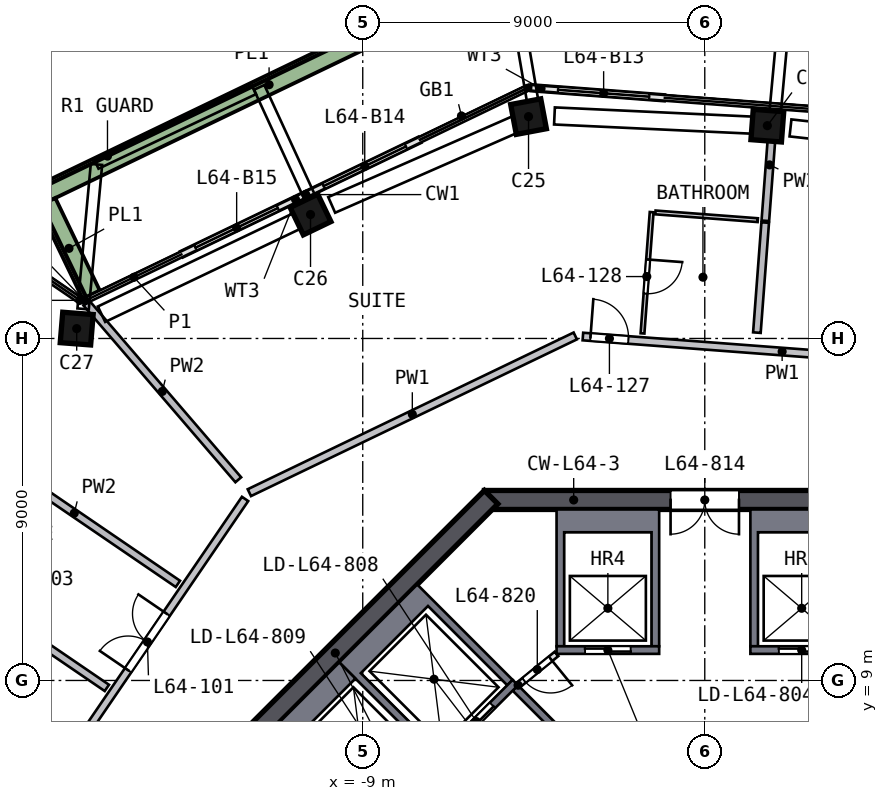
"""IFC4 building model, lengths in metres.
Left out: names, types, materials, properties, quantities, classifications, styles, units other than length and angle.
Written with IfcOpenShell. Run it as: python <this file> out.ifc"""

import sys

from ifc_helpers import new_model, si_unit, direction, frame, frame_2d, origin, origin_2d, place, context, subcontext, project, spatial, polyline, rectangle, outline, extrude, element, fill, save


model = new_model("IFC4")
c1 = context("Model", 3, precision=1e-05, world=origin(), true_north=direction((0.0, 1.0)))
c2 = subcontext(c1, "Body", "Model", "MODEL_VIEW")
j1 = project(units=[si_unit("LENGTHUNIT", "METRE"), si_unit("PLANEANGLEUNIT", "RADIAN")], contexts=[c1])
p1 = place(None, origin())
s1 = spatial("IfcSite", under=j1, at=p1, CompositionType="ELEMENT")
p2 = place(p1, origin())
s2 = spatial("IfcBuilding", under=s1, at=p2, CompositionType="ELEMENT")
p3 = place(p2, frame((0.0, 0.0, 259.5)))
s3 = spatial("IfcBuildingStorey", under=s2, at=p3, CompositionType="ELEMENT", Elevation=259.5)
p4 = place(p3, frame((1.782, 23.591, 0.0), z_axis=(-0.112238709, 0.007601181, 0.9936522), x_axis=(-0.990776389, 0.075549588, -0.112491804)))
e1 = element("IfcColumn", 1, at=p4, inside=s3, PredefinedType="COLUMN", context=c2, shape_type="SweptSolid", body=[
    extrude(rectangle(XDim=0.8, YDim=0.8, at=origin_2d()), origin(), (0.0, 0.0, 1.0), 3.019),
])
p5 = place(p3, frame((-4.501, 23.865, 0.0), z_axis=(-0.113331177, -0.022391395, 0.993304923), x_axis=(0.976067383, 0.184250053, 0.115517882)))
e2 = element("IfcColumn", 2, at=p5, inside=s3, PredefinedType="COLUMN", context=c2, shape_type="SweptSolid", body=[
    extrude(rectangle(XDim=0.8, YDim=0.8, at=origin_2d()), origin(), (0.0, 0.0, 1.0), 3.02),
])
p6 = place(p3, frame((-10.252, 21.322, 0.0), z_axis=(-0.100998536, -0.049569338, 0.993650933), x_axis=(-0.895692503, -0.430206945, -0.112502994)))
e3 = element("IfcColumn", 3, at=p6, inside=s3, PredefinedType="COLUMN", context=c2, shape_type="SweptSolid", body=[
    extrude(rectangle(XDim=0.8, YDim=0.8, at=origin_2d()), origin(), (0.0, 0.0, 1.0), 3.019),
])
p7 = place(p3, frame((-16.422, 18.355, 0.0), z_axis=(-0.08663924, -0.078799682, 0.993118448), x_axis=(0.993392134, -0.082151617, 0.080144738)))
e4 = element("IfcColumn", 4, at=p7, inside=s3, PredefinedType="COLUMN", context=c2, shape_type="SweptSolid", body=[
    extrude(rectangle(XDim=0.8, YDim=0.8, at=origin_2d()), origin(), (0.0, 0.0, 1.0), 3.021),
])
p8 = place(p3, frame((5.799, 13.75, 0.0), z_axis=(0.0, 0.0, 1.0), x_axis=(-1.0, 0.0, 0.0)))
e5 = element("IfcWall", 5, at=p8, inside=s3, PredefinedType="SHEAR", context=c2, shape_type="SweptSolid", body=[
    extrude(rectangle(XDim=11.598, YDim=0.5, at=frame_2d((5.799, 0.0))), origin(), (0.0, 0.0, 1.0), 3.5),
])
p9 = place(p8, frame((4.899, 0.0, 0.0)))
e6 = element("IfcOpeningElement", 6, at=p9, cuts=e5, PredefinedType="OPENING", context=c2, shape_type="SweptSolid", body=[
    extrude(rectangle(XDim=1.8, YDim=2.1, at=frame_2d((0.9, 1.05))), frame((0.0, 0.26, 0.0), z_axis=(0.0, -1.0, 0.0), x_axis=(1.0, 0.0, 0.0)), (0.0, 0.0, 1.0), 0.52),
])
p10 = place(p3, frame((-5.622, 13.823, 0.0), z_axis=(0.0, 0.0, 1.0), x_axis=(-0.707106781, -0.707106781, 0.0)))
e7 = element("IfcWall", 7, at=p10, inside=s3, PredefinedType="SHEAR", context=c2, shape_type="SweptSolid", body=[
    extrude(rectangle(XDim=11.598, YDim=0.5, at=frame_2d((5.799, 0.0))), origin(), (0.0, 0.0, 1.0), 3.5),
])
p11 = place(p3, frame((-1.066, 24.333, 0.0), z_axis=(0.0, 0.0, 1.0), x_axis=(-0.997159679, 0.075316491, 0.0)))
e8 = element("IfcWall", 8, at=p11, inside=s3, PredefinedType="SOLIDWALL", context=c2, shape_type="SweptSolid", body=[
    extrude(rectangle(XDim=3.504, YDim=0.15, at=frame_2d((1.752, 0.0))), origin(), (0.0, 0.0, 1.0), 2.935),
])
p12 = place(p11, frame((0.4, 0.0, 0.0)))
e9 = element("IfcOpeningElement", 9, at=p12, cuts=e8, PredefinedType="OPENING", context=c2, shape_type="SweptSolid", body=[
    extrude(rectangle(XDim=2.4, YDim=2.4, at=frame_2d((1.2, 1.2))), frame((0.0, 0.085, 0.0), z_axis=(0.0, -1.0, 0.0), x_axis=(1.0, 0.0, 0.0)), (0.0, 0.0, 1.0), 0.17),
])
p13 = place(p3, frame((-7.506, 23.225, 0.0), z_axis=(0.0, 0.0, 1.0), x_axis=(-0.901215754, -0.433370702, 0.0)))
e10 = element("IfcWall", 10, at=p13, inside=s3, PredefinedType="SOLIDWALL", context=c2, shape_type="SweptSolid", body=[
    extrude(rectangle(XDim=3.3, YDim=0.15, at=frame_2d((1.65, 0.0))), origin(), (0.0, 0.0, 1.0), 2.935),
])
p14 = place(p13, frame((0.4, 0.0, 0.0)))
e11 = element("IfcOpeningElement", 11, at=p14, cuts=e10, PredefinedType="OPENING", context=c2, shape_type="SweptSolid", body=[
    extrude(rectangle(XDim=2.4, YDim=2.4, at=frame_2d((1.2, 1.2))), frame((0.0, 0.085, 0.0), z_axis=(0.0, -1.0, 0.0), x_axis=(1.0, 0.0, 0.0)), (0.0, 0.0, 1.0), 0.17),
])
p15 = place(p3, frame((-10.48, 21.795, 0.0), z_axis=(0.0, 0.0, 1.0), x_axis=(-0.90124235, -0.43331539, 0.0)))
e12 = element("IfcWall", 12, at=p15, inside=s3, PredefinedType="SOLIDWALL", context=c2, shape_type="SweptSolid", body=[
    extrude(rectangle(XDim=3.64, YDim=0.15, at=frame_2d((1.82, 0.0))), origin(), (0.0, 0.0, 1.0), 2.935),
])
p16 = place(p15, frame((0.84, 0.0, 0.0)))
e13 = element("IfcOpeningElement", 13, at=p16, cuts=e12, PredefinedType="OPENING", context=c2, shape_type="SweptSolid", body=[
    extrude(rectangle(XDim=2.4, YDim=2.4, at=frame_2d((1.2, 1.2))), frame((0.0, 0.085, 0.0), z_axis=(0.0, -1.0, 0.0), x_axis=(1.0, 0.0, 0.0)), (0.0, 0.0, 1.0), 0.17),
])
p17 = place(p3, frame((-5.281, 27.651, 0.0), z_axis=(0.0, 0.0, 1.0), x_axis=(-0.901229979, -0.433341118, 0.0)))
e14 = element("IfcWall", 14, at=p17, inside=s3, PredefinedType="SOLIDWALL", context=c2, shape_type="SweptSolid", body=[
    extrude(rectangle(XDim=13.724, YDim=0.5, at=frame_2d((6.862, 0.0))), origin(), (0.0, 0.0, 1.0), 0.7),
])
p18 = place(p3, frame((-17.315, 21.587, 0.0), z_axis=(0.0, 0.0, 1.0), x_axis=(0.433374971, -0.901213701, 0.0)))
e15 = element("IfcWall", 15, at=p18, inside=s3, PredefinedType="SOLIDWALL", context=c2, shape_type="SweptSolid", body=[
    extrude(rectangle(XDim=2.699, YDim=0.5, at=frame_2d((1.35, 0.0))), origin(), (0.0, 0.0, 1.0), 0.7),
])
p19 = place(p3, origin())
e16 = element("IfcWall", 16, at=p19, inside=s3, PredefinedType="SOLIDWALL", context=c2, shape_type="SweptSolid", body=[
    extrude(outline(polyline([(3.9, 9.9), (3.7, 9.9), (3.7, 12.9), (1.4, 12.9), (1.4, 9.9), (1.2, 9.9), (1.2, 13.5), (3.9, 13.5), (3.9, 9.9)])), origin(), (0.0, 0.0, 1.0), 3.0),
])
p20 = place(p3, frame((1.2, 9.8, 0.0), z_axis=(0.0, 0.0, 1.0), x_axis=(1.0, 0.0, 0.0)))
e17 = element("IfcWall", 17, at=p20, inside=s3, PredefinedType="SOLIDWALL", context=c2, shape_type="SweptSolid", body=[
    extrude(rectangle(XDim=2.7, YDim=0.2, at=frame_2d((1.35, 0.0))), origin(), (0.0, 0.0, 1.0), 3.0),
])
p21 = place(p20, frame((0.75, 0.0, 0.0)))
e18 = element("IfcOpeningElement", 18, at=p21, cuts=e17, PredefinedType="OPENING", context=c2, shape_type="SweptSolid", body=[
    extrude(rectangle(XDim=1.2, YDim=2.1, at=frame_2d((0.6, 1.05))), frame((0.0, 0.11, 0.0), z_axis=(0.0, -1.0, 0.0), x_axis=(1.0, 0.0, 0.0)), (0.0, 0.0, 1.0), 0.22),
])
p22 = place(p3, origin())
e19 = element("IfcWall", 19, at=p22, inside=s3, PredefinedType="SOLIDWALL", context=c2, shape_type="SweptSolid", body=[
    extrude(outline(polyline([(-3.9, 13.5), (-1.2, 13.5), (-1.2, 9.9), (-1.4, 9.9), (-1.4, 12.9), (-3.7, 12.9), (-3.7, 9.9), (-3.9, 9.9), (-3.9, 13.5)])), origin(), (0.0, 0.0, 1.0), 3.0),
])
p23 = place(p3, frame((-1.2, 9.8, 0.0), z_axis=(0.0, 0.0, 1.0), x_axis=(-1.0, 0.0, 0.0)))
e20 = element("IfcWall", 20, at=p23, inside=s3, PredefinedType="SOLIDWALL", context=c2, shape_type="SweptSolid", body=[
    extrude(rectangle(XDim=2.7, YDim=0.2, at=frame_2d((1.35, 0.0))), origin(), (0.0, 0.0, 1.0), 3.0),
])
p24 = place(p23, frame((0.75, 0.0, 0.0)))
e21 = element("IfcOpeningElement", 21, at=p24, cuts=e20, PredefinedType="OPENING", context=c2, shape_type="SweptSolid", body=[
    extrude(rectangle(XDim=1.2, YDim=2.1, at=frame_2d((0.6, 1.05))), frame((0.0, 0.11, 0.0), z_axis=(0.0, -1.0, 0.0), x_axis=(1.0, 0.0, 0.0)), (0.0, 0.0, 1.0), 0.22),
])
p25 = place(p3, origin())
e22 = element("IfcWall", 22, at=p25, inside=s3, PredefinedType="SOLIDWALL", context=c2, shape_type="SweptSolid", body=[
    extrude(outline(polyline([(-9.617, 9.475), (-7.566, 11.526), (-5.056, 9.016), (-5.197, 8.874), (-7.283, 10.96), (-9.051, 9.192), (-6.965, 7.106), (-7.106, 6.965), (-9.617, 9.475)])), origin(), (0.0, 0.0, 1.0), 3.0),
])
p26 = place(p3, frame((-4.985, 8.945, 0.0), z_axis=(0.0, 0.0, 1.0), x_axis=(-0.707106781, -0.707106781, 0.0)))
e23 = element("IfcWall", 23, at=p26, inside=s3, PredefinedType="SOLIDWALL", context=c2, shape_type="SweptSolid", body=[
    extrude(rectangle(XDim=2.9, YDim=0.2, at=frame_2d((1.45, 0.0))), origin(), (0.0, 0.0, 1.0), 3.0),
])
p27 = place(p26, frame((0.85, 0.0, 0.0)))
e24 = element("IfcOpeningElement", 24, at=p27, cuts=e23, PredefinedType="OPENING", context=c2, shape_type="SweptSolid", body=[
    extrude(rectangle(XDim=1.2, YDim=2.1, at=frame_2d((0.6, 1.05))), frame((0.0, 0.11, 0.0), z_axis=(0.0, -1.0, 0.0), x_axis=(1.0, 0.0, 0.0)), (0.0, 0.0, 1.0), 0.22),
])
p28 = place(p3, origin())
e25 = element("IfcWall", 25, at=p28, inside=s3, PredefinedType="SOLIDWALL", context=c2, shape_type="SweptSolid", body=[
    extrude(outline(polyline([(-11.526, 7.566), (-9.617, 9.475), (-9.192, 9.051), (-10.96, 7.283), (-8.874, 5.197), (-9.016, 5.056), (-11.526, 7.566)])), origin(), (0.0, 0.0, 1.0), 3.0),
])
p29 = place(p3, frame((-3.005, 6.823, 0.0), z_axis=(0.0, 0.0, 1.0), x_axis=(-0.707106781, 0.707106781, 0.0)))
e26 = element("IfcWall", 26, at=p29, inside=s3, PredefinedType="SOLIDWALL", context=c2, shape_type="SweptSolid", body=[
    extrude(rectangle(XDim=2.8, YDim=0.2, at=frame_2d((1.4, 0.0))), origin(), (0.0, 0.0, 1.0), 3.0),
])
p30 = place(p3, frame((-3.9, 9.7, 0.0), z_axis=(0.0, 0.0, 1.0), x_axis=(-0.775559878, -0.631274009, 0.0)))
e27 = element("IfcWall", 27, at=p30, inside=s3, PredefinedType="PARTITIONING", context=c2, shape_type="SweptSolid", body=[
    extrude(rectangle(XDim=1.308, YDim=0.15, at=frame_2d((0.654, 0.0))), origin(), (0.0, 0.0, 1.0), 3.0),
])
p31 = place(p30, frame((0.204, 0.0, 0.0)))
e28 = element("IfcOpeningElement", 28, at=p31, cuts=e27, PredefinedType="OPENING", context=c2, shape_type="SweptSolid", body=[
    extrude(rectangle(XDim=0.9, YDim=2.1, at=frame_2d((0.45, 1.05))), frame((0.0, 0.085, 0.0), z_axis=(0.0, -1.0, 0.0), x_axis=(1.0, 0.0, 0.0)), (0.0, 0.0, 1.0), 0.17),
])
p32 = place(p3, frame((-17.349, 6.083, 0.0), z_axis=(0.0, 0.0, 1.0), x_axis=(0.563804288, 0.825908424, 0.0)))
e29 = element("IfcWall", 29, at=p32, inside=s3, PredefinedType="SOLIDWALL", context=c2, shape_type="SweptSolid", body=[
    extrude(rectangle(XDim=9.316, YDim=0.2, at=frame_2d((4.658, 0.0))), origin(), (0.0, 0.0, 1.0), 3.0),
])
p33 = place(p32, frame((3.859, 0.0, 0.0)))
e30 = element("IfcOpeningElement", 30, at=p33, cuts=e29, PredefinedType="OPENING", context=c2, shape_type="SweptSolid", body=[
    extrude(rectangle(XDim=1.8, YDim=2.1, at=frame_2d((0.9, 1.05))), frame((0.0, 0.11, 0.0), z_axis=(0.0, -1.0, 0.0), x_axis=(1.0, 0.0, 0.0)), (0.0, 0.0, 1.0), 0.22),
])
p34 = place(p3, frame((-3.408, 18.066, 0.0), z_axis=(0.0, 0.0, 1.0), x_axis=(-0.901226991, -0.433347333, 0.0)))
e31 = element("IfcWall", 31, at=p34, inside=s3, PredefinedType="SOLIDWALL", context=c2, shape_type="SweptSolid", body=[
    extrude(rectangle(XDim=9.516, YDim=0.2, at=frame_2d((4.758, 0.0))), origin(), (0.0, 0.0, 1.0), 3.0),
])
p35 = place(p3, frame((-3.207, 18.051, 0.0), z_axis=(0.0, 0.0, 1.0), x_axis=(0.997158012, -0.075338566, 0.0)))
e32 = element("IfcWall", 32, at=p35, inside=s3, PredefinedType="SOLIDWALL", context=c2, shape_type="SweptSolid", body=[
    extrude(rectangle(XDim=9.116, YDim=0.2, at=frame_2d((4.558, 0.0))), origin(), (0.0, 0.0, 1.0), 3.0),
])
p36 = place(p35, frame((0.2, 0.0, 0.0)))
e33 = element("IfcOpeningElement", 33, at=p36, cuts=e32, PredefinedType="OPENING", context=c2, shape_type="SweptSolid", body=[
    extrude(rectangle(XDim=1.0, YDim=2.1, at=frame_2d((0.5, 1.05))), frame((0.0, 0.11, 0.0), z_axis=(0.0, -1.0, 0.0), x_axis=(1.0, 0.0, 0.0)), (0.0, 0.0, 1.0), 0.22),
])
p37 = place(p3, frame((-15.733, 8.804, 0.0), z_axis=(0.0, 0.0, 1.0), x_axis=(-0.825907835, 0.563805151, 0.0)))
e34 = element("IfcWall", 34, at=p37, inside=s3, PredefinedType="SOLIDWALL", context=c2, shape_type="SweptSolid", body=[
    extrude(rectangle(XDim=10.302, YDim=0.2, at=frame_2d((5.151, 0.0))), origin(), (0.0, 0.0, 1.0), 3.0),
])
p38 = place(p37, frame((2.95, 0.0, 0.0)))
e35 = element("IfcOpeningElement", 35, at=p38, cuts=e34, PredefinedType="OPENING", context=c2, shape_type="SweptSolid", body=[
    extrude(rectangle(XDim=1.0, YDim=2.1, at=frame_2d((0.5, 1.05))), frame((0.0, 0.11, 0.0), z_axis=(0.0, -1.0, 0.0), x_axis=(1.0, 0.0, 0.0)), (0.0, 0.0, 1.0), 0.22),
])
p39 = place(p3, frame((-22.373, 17.351, 0.0), z_axis=(0.0, 0.0, 1.0), x_axis=(0.8258968, -0.563821315, 0.0)))
e36 = element("IfcWall", 36, at=p39, inside=s3, PredefinedType="SOLIDWALL", context=c2, shape_type="SweptSolid", body=[
    extrude(rectangle(XDim=10.302, YDim=0.2, at=frame_2d((5.151, 0.0))), origin(), (0.0, 0.0, 1.0), 3.0),
])
p40 = place(p39, frame((2.5, 0.0, 0.0)))
e37 = element("IfcOpeningElement", 37, at=p40, cuts=e36, PredefinedType="OPENING", context=c2, shape_type="SweptSolid", body=[
    extrude(rectangle(XDim=1.0, YDim=2.1, at=frame_2d((0.5, 1.05))), frame((0.0, 0.11, 0.0), z_axis=(0.0, -1.0, 0.0), x_axis=(1.0, 0.0, 0.0)), (0.0, 0.0, 1.0), 0.22),
])
p41 = place(p3, frame((-16.272, 18.932, 0.0), z_axis=(0.0, 0.0, 1.0), x_axis=(0.651826856, -0.75836782, 0.0)))
e38 = element("IfcWall", 38, at=p41, inside=s3, PredefinedType="SOLIDWALL", context=c2, shape_type="SweptSolid", body=[
    extrude(rectangle(XDim=6.132, YDim=0.2, at=frame_2d((3.066, 0.0))), origin(), (0.0, 0.0, 1.0), 3.0),
])
p42 = place(p3, frame((1.371, 18.154, 0.0), z_axis=(0.0, 0.0, 1.0), x_axis=(0.075308129, 0.997160311, 0.0)))
e39 = element("IfcWall", 39, at=p42, inside=s3, PredefinedType="SOLIDWALL", context=c2, shape_type="SweptSolid", body=[
    extrude(rectangle(XDim=2.905, YDim=0.2, at=frame_2d((1.452, 0.0))), origin(), (0.0, 0.0, 1.0), 3.0),
])
p43 = place(p3, frame((1.594, 21.096, 0.0), z_axis=(0.0, 0.0, 1.0), x_axis=(0.075343008, 0.997157676, 0.0)))
e40 = element("IfcWall", 40, at=p43, inside=s3, PredefinedType="SOLIDWALL", context=c2, shape_type="SweptSolid", body=[
    extrude(rectangle(XDim=2.952, YDim=0.2, at=frame_2d((1.476, 0.0))), origin(), (0.0, 0.0, 1.0), 3.0),
])
p44 = place(p3, frame((-1.398, 21.324, 0.0), z_axis=(0.0, 0.0, 1.0), x_axis=(-0.075302041, -0.997160771, 0.0)))
e41 = element("IfcWall", 41, at=p44, inside=s3, PredefinedType="PARTITIONING", context=c2, shape_type="SweptSolid", body=[
    extrude(rectangle(XDim=3.2, YDim=0.1, at=frame_2d((1.6, 0.0))), origin(), (0.0, 0.0, 1.0), 3.0),
])
p45 = place(p44, frame((1.25, 0.0, 0.0)))
e42 = element("IfcOpeningElement", 42, at=p45, cuts=e41, PredefinedType="OPENING", context=c2, shape_type="SweptSolid", body=[
    extrude(rectangle(XDim=0.9, YDim=2.1, at=frame_2d((0.45, 1.05))), frame((0.0, 0.06, 0.0), z_axis=(0.0, -1.0, 0.0), x_axis=(1.0, 0.0, 0.0)), (0.0, 0.0, 1.0), 0.12),
])
p46 = place(p3, frame((-1.298, 21.317, 0.0), z_axis=(0.0, 0.0, 1.0), x_axis=(0.997159381, -0.075320436, 0.0)))
e43 = element("IfcWall", 43, at=p46, inside=s3, PredefinedType="PARTITIONING", context=c2, shape_type="SweptSolid", body=[
    extrude(rectangle(XDim=2.7, YDim=0.1, at=frame_2d((1.35, 0.0))), origin(), (0.0, 0.0, 1.0), 3.0),
])
p47 = place(p12, origin())
e44 = element("IfcDoor", 44, at=p47, inside=s3, OperationType="SLIDING_TO_RIGHT", PredefinedType="DOOR", context=c2, shape_type="SweptSolid", body=[
    extrude(rectangle(XDim=2.4, YDim=2.4, at=frame_2d((1.2, 1.2))), frame((0.0, 0.025, 0.0), z_axis=(0.0, -1.0, 0.0), x_axis=(1.0, 0.0, 0.0)), (0.0, 0.0, 1.0), 0.05),
])
fill(e9, e44)
p48 = place(p14, origin())
e45 = element("IfcDoor", 45, at=p48, inside=s3, OperationType="SLIDING_TO_RIGHT", PredefinedType="DOOR", context=c2, shape_type="SweptSolid", body=[
    extrude(rectangle(XDim=2.4, YDim=2.4, at=frame_2d((1.2, 1.2))), frame((0.0, 0.025, 0.0), z_axis=(0.0, -1.0, 0.0), x_axis=(1.0, 0.0, 0.0)), (0.0, 0.0, 1.0), 0.05),
])
fill(e11, e45)
p49 = place(p16, origin())
e46 = element("IfcDoor", 46, at=p49, inside=s3, OperationType="SLIDING_TO_LEFT", PredefinedType="DOOR", context=c2, shape_type="SweptSolid", body=[
    extrude(rectangle(XDim=2.4, YDim=2.4, at=frame_2d((1.2, 1.2))), frame((0.0, 0.025, 0.0), z_axis=(0.0, -1.0, 0.0), x_axis=(1.0, 0.0, 0.0)), (0.0, 0.0, 1.0), 0.05),
])
fill(e13, e46)
p50 = place(p21, origin())
e47 = element("IfcDoor", 47, at=p50, inside=s3, OperationType="DOUBLE_DOOR_SLIDING", PredefinedType="DOOR", context=c2, shape_type="SweptSolid", body=[
    extrude(rectangle(XDim=1.2, YDim=2.1, at=frame_2d((0.6, 1.05))), frame((0.0, 0.025, 0.0), z_axis=(0.0, -1.0, 0.0), x_axis=(1.0, 0.0, 0.0)), (0.0, 0.0, 1.0), 0.05),
])
fill(e18, e47)
p51 = place(p24, origin())
e48 = element("IfcDoor", 48, at=p51, inside=s3, OperationType="DOUBLE_DOOR_SLIDING", PredefinedType="DOOR", context=c2, shape_type="SweptSolid", body=[
    extrude(rectangle(XDim=1.2, YDim=2.1, at=frame_2d((0.6, 1.05))), frame((0.0, 0.025, 0.0), z_axis=(0.0, -1.0, 0.0), x_axis=(1.0, 0.0, 0.0)), (0.0, 0.0, 1.0), 0.05),
])
fill(e21, e48)
p52 = place(p27, origin())
e49 = element("IfcDoor", 49, at=p52, inside=s3, OperationType="DOUBLE_DOOR_SLIDING", PredefinedType="DOOR", context=c2, shape_type="SweptSolid", body=[
    extrude(rectangle(XDim=1.2, YDim=2.1, at=frame_2d((0.6, 1.05))), frame((0.0, 0.025, 0.0), z_axis=(0.0, -1.0, 0.0), x_axis=(1.0, 0.0, 0.0)), (0.0, 0.0, 1.0), 0.05),
])
fill(e24, e49)
p53 = place(p9, origin())
e50 = element("IfcDoor", 50, at=p53, inside=s3, OperationType="DOUBLE_DOOR_SINGLE_SWING", PredefinedType="DOOR", context=c2, shape_type="SweptSolid", body=[
    extrude(rectangle(XDim=1.8, YDim=2.1, at=frame_2d((0.9, 1.05))), frame((0.0, 0.025, 0.0), z_axis=(0.0, -1.0, 0.0), x_axis=(1.0, 0.0, 0.0)), (0.0, 0.0, 1.0), 0.05),
])
fill(e6, e50)
p54 = place(p31, origin())
e51 = element("IfcDoor", 51, at=p54, inside=s3, OperationType="SINGLE_SWING_LEFT", PredefinedType="DOOR", context=c2, shape_type="SweptSolid", body=[
    extrude(rectangle(XDim=0.9, YDim=2.1, at=frame_2d((0.45, 1.05))), frame((0.0, 0.025, 0.0), z_axis=(0.0, -1.0, 0.0), x_axis=(1.0, 0.0, 0.0)), (0.0, 0.0, 1.0), 0.05),
])
fill(e28, e51)
p55 = place(p33, origin())
e52 = element("IfcDoor", 52, at=p55, inside=s3, OperationType="DOUBLE_DOOR_SINGLE_SWING", PredefinedType="DOOR", context=c2, shape_type="SweptSolid", body=[
    extrude(rectangle(XDim=1.8, YDim=2.1, at=frame_2d((0.9, 1.05))), frame((0.0, 0.025, 0.0), z_axis=(0.0, -1.0, 0.0), x_axis=(1.0, 0.0, 0.0)), (0.0, 0.0, 1.0), 0.05),
])
fill(e30, e52)
p56 = place(p36, origin())
e53 = element("IfcDoor", 53, at=p56, inside=s3, OperationType="SINGLE_SWING_LEFT", PredefinedType="DOOR", context=c2, shape_type="SweptSolid", body=[
    extrude(rectangle(XDim=1.0, YDim=2.1, at=frame_2d((0.5, 1.05))), frame((0.0, 0.025, 0.0), z_axis=(0.0, -1.0, 0.0), x_axis=(1.0, 0.0, 0.0)), (0.0, 0.0, 1.0), 0.05),
])
fill(e33, e53)
p57 = place(p45, origin())
e54 = element("IfcDoor", 54, at=p57, inside=s3, OperationType="SINGLE_SWING_LEFT", PredefinedType="DOOR", context=c2, shape_type="SweptSolid", body=[
    extrude(rectangle(XDim=0.9, YDim=2.1, at=frame_2d((0.45, 1.05))), frame((0.0, 0.025, 0.0), z_axis=(0.0, -1.0, 0.0), x_axis=(1.0, 0.0, 0.0)), (0.0, 0.0, 1.0), 0.05),
])
fill(e42, e54)
save(model, sys.argv[1])
